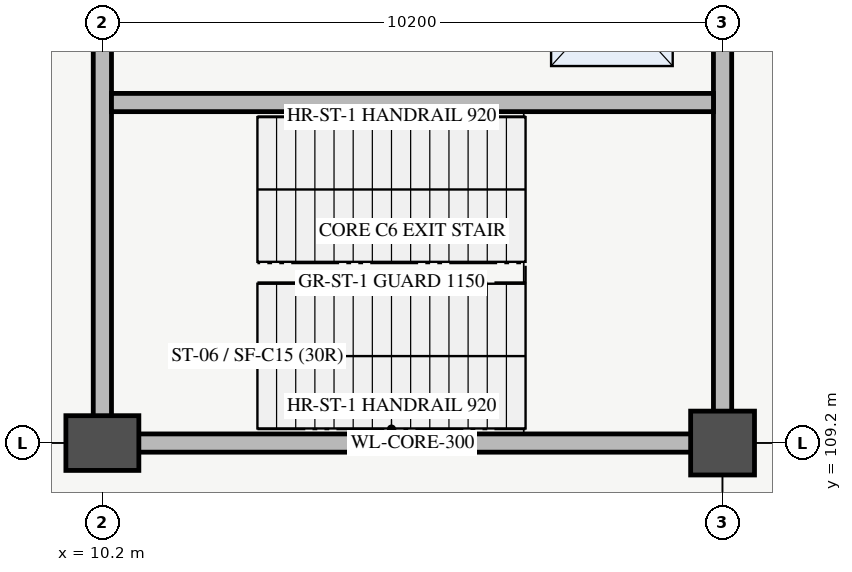
"""IFC4 building model, lengths in metres.
Left out: names, types, materials, properties, quantities, classifications, styles, units other than length and angle.
Written with IfcOpenShell. Run it as: python <this file> out.ifc"""

import sys

from ifc_helpers import new_model, si_unit, direction, frame, frame_2d, origin, origin_2d, place, context, subcontext, project, spatial, rectangle, extrude, element, save


model = new_model("IFC4")
c1 = context("Model", 3, precision=1e-05, world=origin(), true_north=direction((0.0, 1.0)))
c2 = subcontext(c1, "Body", "Model", "MODEL_VIEW")
j1 = project(units=[si_unit("LENGTHUNIT", "METRE"), si_unit("PLANEANGLEUNIT", "RADIAN")], contexts=[c1])
p1 = place(None, origin())
s1 = spatial("IfcSite", under=j1, at=p1, CompositionType="ELEMENT")
p2 = place(p1, origin())
s2 = spatial("IfcBuilding", under=s1, at=p2, CompositionType="ELEMENT")
p3 = place(p2, frame((0.0, 0.0, -4.5)))
s3 = spatial("IfcBuildingStorey", under=s2, at=p3, CompositionType="ELEMENT", Elevation=-4.5)
p4 = place(p3, frame((10.2, 109.2, 0.0), z_axis=(0.0, 0.0, 1.0), x_axis=(1.0, 0.0, 0.0)))
e1 = element("IfcColumn", 1, at=p4, inside=s3, PredefinedType="COLUMN", context=c2, shape_type="SweptSolid", body=[
    extrude(rectangle(XDim=1.2, YDim=0.9, at=origin_2d()), origin(), (0.0, 0.0, 1.0), 4.5),
])
p5 = place(p3, frame((20.4, 109.2, 0.0), z_axis=(0.0, 0.0, 1.0), x_axis=(1.0, 0.0, 0.0)))
e2 = element("IfcColumn", 2, at=p5, inside=s3, PredefinedType="COLUMN", context=c2, shape_type="SweptSolid", body=[
    extrude(rectangle(XDim=1.05, YDim=1.05, at=origin_2d()), origin(), (0.0, 0.0, 1.0), 4.5),
])
p6 = place(p3, frame((10.2, 109.2, 0.0), z_axis=(0.0, 0.0, 1.0), x_axis=(1.0, 0.0, 0.0)))
e3 = element("IfcWall", 3, at=p6, inside=s3, PredefinedType="SHEAR", context=c2, shape_type="SweptSolid", body=[
    extrude(rectangle(XDim=10.2, YDim=0.3, at=frame_2d((5.1, 0.0))), origin(), (0.0, 0.0, 1.0), 4.5),
])
for number, where, z_axis, x_axis in (
    (4, (10.2, 109.2, 0.0), (0.0, 0.0, 1.0), (0.0, 1.0, 0.0)),
    (5, (20.4, 109.2, 0.0), (0.0, 0.0, 1.0), (0.0, 1.0, 0.0)),
):
    element("IfcWall", number, at=place(p3, frame(where, z_axis=z_axis, x_axis=x_axis)), inside=s3, PredefinedType="SHEAR", context=c2, shape_type="SweptSolid", body=[
        extrude(rectangle(XDim=9.6, YDim=0.3, at=frame_2d((4.8, 0.0))), origin(), (0.0, 0.0, 1.0), 4.5),
    ])
p7 = place(p3, frame((10.35, 114.8, 0.0), z_axis=(0.0, 0.0, 1.0), x_axis=(1.0, 0.0, 0.0)))
e6 = element("IfcWall", 6, at=p7, inside=s3, PredefinedType="SHEAR", context=c2, shape_type="SweptSolid", body=[
    extrude(rectangle(XDim=9.9, YDim=0.3, at=frame_2d((4.95, 0.0))), origin(), (0.0, 0.0, 1.0), 4.5),
])
save(model, sys.argv[1])
